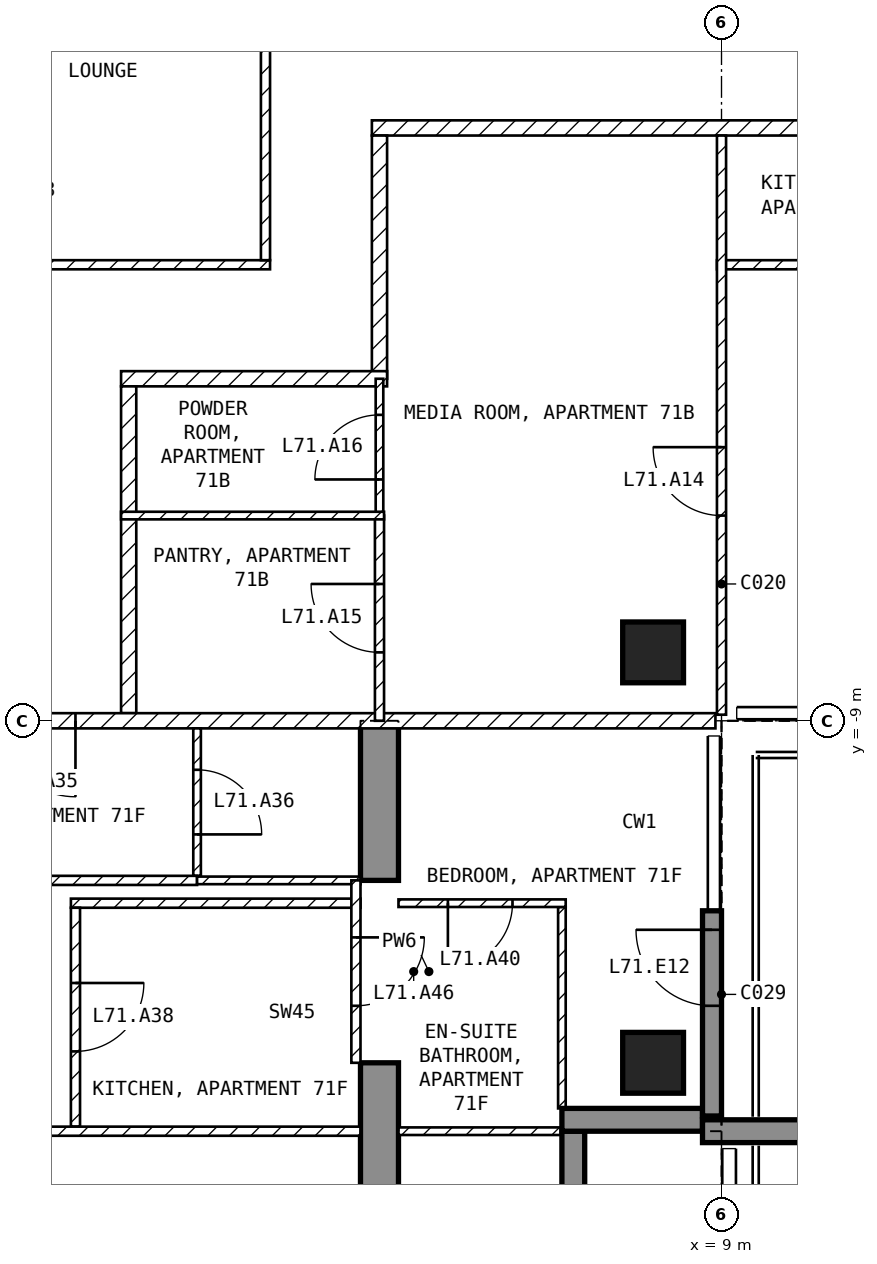
"""IFC4 building model, lengths in metres.
Left out: names, types, materials, properties, quantities, classifications, styles, units other than length and angle.
Written with IfcOpenShell. Run it as: python <this file> out.ifc"""

import sys

from ifc_helpers import new_model, si_unit, direction, frame, frame_2d, origin, origin_2d, place, context, subcontext, project, spatial, polyline, rectangle, outline, extrude, element, fill, save


model = new_model("IFC4")
c1 = context("Model", 3, precision=1e-05, world=origin(), true_north=direction((0.0, 1.0)))
c2 = subcontext(c1, "Body", "Model", "MODEL_VIEW")
j1 = project(units=[si_unit("LENGTHUNIT", "METRE"), si_unit("PLANEANGLEUNIT", "RADIAN")], contexts=[c1])
p1 = place(None, origin())
s1 = spatial("IfcSite", under=j1, at=p1, CompositionType="ELEMENT")
p2 = place(p1, origin())
s2 = spatial("IfcBuilding", under=s1, at=p2, CompositionType="ELEMENT")
p3 = place(p2, frame((0.0, 0.0, 278.0)))
s3 = spatial("IfcBuildingStorey", under=s2, at=p3, CompositionType="ELEMENT", Elevation=278.0)
for number, where, z_axis, x_axis in (
    (1, (8.1, -13.5, -0.25), (0.0, 0.0, 1.0), (1.0, 0.0, 0.0)),
    (2, (8.1, -8.1, -0.25), (0.0, 0.0, 1.0), (1.0, 0.0, 0.0)),
):
    element("IfcColumn", number, at=place(p3, frame(where, z_axis=z_axis, x_axis=x_axis)), inside=s3, PredefinedType="COLUMN", context=c2, shape_type="SweptSolid", body=[
        extrude(rectangle(XDim=0.8, YDim=0.8, at=origin_2d()), origin(), (0.0, 0.0, 1.0), 3.5),
    ])
p4 = place(p3, frame((4.25, -16.7, -0.25), z_axis=(1.0, 0.0, 0.0), x_axis=(0.0, 1.0, 0.0)))
e3 = element("IfcWall", 3, at=p4, inside=s3, PredefinedType="SHEAR", context=c2, shape_type="SweptSolid", body=[
    extrude(outline(polyline([(0.0, 0.0), (3.2, 0.0), (3.2, 2.65), (5.6, 2.65), (5.6, 0.0), (7.7, 0.0), (7.7, 3.5), (0.0, 3.5), (0.0, 0.0)])), origin(), (0.0, 0.0, 1.0), 0.5),
])
p5 = place(p3, frame((8.875, -14.2, 0.0), z_axis=(0.0, 0.0, 1.0), x_axis=(0.0, 1.0, 0.0)))
e4 = element("IfcWall", 4, at=p5, inside=s3, PredefinedType="SOLIDWALL", context=c2, shape_type="SweptSolid", body=[
    extrude(rectangle(XDim=2.7, YDim=0.25, at=frame_2d((1.35, 0.0))), origin(), (0.0, 0.0, 1.0), 3.25),
])
p6 = place(p5, frame((1.45, 0.0, 0.0)))
e5 = element("IfcOpeningElement", 5, at=p6, cuts=e4, PredefinedType="OPENING", context=c2, shape_type="SweptSolid", body=[
    extrude(rectangle(XDim=1.0, YDim=2.4, at=frame_2d((0.5, 1.2))), frame((0.0, 0.135, 0.0), z_axis=(0.0, -1.0, 0.0), x_axis=(1.0, 0.0, 0.0)), (0.0, 0.0, 1.0), 0.27),
])
p7 = place(p3, frame((7.05, -16.2, 0.0), z_axis=(0.0, 0.0, 1.0), x_axis=(0.0, 1.0, 0.0)))
e6 = element("IfcWall", 6, at=p7, inside=s3, PredefinedType="SOLIDWALL", context=c2, shape_type="SweptSolid", body=[
    extrude(rectangle(XDim=1.8, YDim=0.3, at=frame_2d((0.9, 0.0))), origin(), (0.0, 0.0, 1.0), 3.25),
])
p8 = place(p3, frame((6.9, -14.25, 0.0), z_axis=(0.0, 0.0, 1.0), x_axis=(1.0, 0.0, 0.0)))
e7 = element("IfcWall", 7, at=p8, inside=s3, PredefinedType="SOLIDWALL", context=c2, shape_type="SweptSolid", body=[
    extrude(rectangle(XDim=1.85, YDim=0.3, at=frame_2d((0.925, 0.0))), origin(), (0.0, 0.0, 1.0), 3.25),
])
p9 = place(p3, frame((8.75, -14.4, 0.0), z_axis=(0.0, 0.0, 1.0), x_axis=(1.0, 0.0, 0.0)))
e8 = element("IfcWall", 8, at=p9, inside=s3, PredefinedType="SOLIDWALL", context=c2, shape_type="SweptSolid", body=[
    extrude(rectangle(XDim=2.95, YDim=0.3, at=frame_2d((1.475, 0.0))), origin(), (0.0, 0.0, 1.0), 3.25),
])
p10 = place(p3, frame((-3.06, -3.0, 0.0), z_axis=(0.0, 0.0, 1.0), x_axis=(1.0, 0.0, 0.0)))
e9 = element("IfcWall", 9, at=p10, inside=s3, PredefinedType="PARTITIONING", context=c2, shape_type="SweptSolid", body=[
    extrude(rectangle(XDim=6.12, YDim=0.12, at=frame_2d((3.06, 0.0))), origin(), (0.0, 0.0, 1.0), 3.25),
])
p11 = place(p3, frame((3.0, -2.94, 0.0), z_axis=(0.0, 0.0, 1.0), x_axis=(0.0, 1.0, 0.0)))
e10 = element("IfcWall", 10, at=p11, inside=s3, PredefinedType="PARTITIONING", context=c2, shape_type="SweptSolid", body=[
    extrude(rectangle(XDim=5.88, YDim=0.12, at=frame_2d((2.94, 0.0))), origin(), (0.0, 0.0, 1.0), 3.25),
])
p12 = place(p3, frame((21.6, -1.2, 0.0), z_axis=(0.0, 0.0, 1.0), x_axis=(-1.0, 0.0, 0.0)))
e11 = element("IfcWall", 11, at=p12, inside=s3, PredefinedType="PARTITIONING", context=c2, shape_type="SweptSolid", body=[
    extrude(rectangle(XDim=17.2, YDim=0.2, at=frame_2d((8.6, 0.0))), origin(), (0.0, 0.0, 1.0), 3.25),
])
p13 = place(p12, frame((7.9, 0.0, 0.0)))
e12 = element("IfcOpeningElement", 12, at=p13, cuts=e11, PredefinedType="OPENING", context=c2, shape_type="SweptSolid", body=[
    extrude(rectangle(XDim=1.0, YDim=2.1, at=frame_2d((0.5, 1.05))), frame((0.0, 0.11, 0.0), z_axis=(0.0, -1.0, 0.0), x_axis=(1.0, 0.0, 0.0)), (0.0, 0.0, 1.0), 0.22),
])
p14 = place(p3, frame((4.5, -1.3, 0.0), z_axis=(0.0, 0.0, 1.0), x_axis=(0.0, -1.0, 0.0)))
e13 = element("IfcWall", 13, at=p14, inside=s3, PredefinedType="PARTITIONING", context=c2, shape_type="SweptSolid", body=[
    extrude(rectangle(XDim=3.2, YDim=0.2, at=frame_2d((1.6, 0.0))), origin(), (0.0, 0.0, 1.0), 3.25),
])
p15 = place(p3, frame((4.6, -4.5, 0.0), z_axis=(0.0, 0.0, 1.0), x_axis=(-1.0, 0.0, 0.0)))
e14 = element("IfcWall", 14, at=p15, inside=s3, PredefinedType="PARTITIONING", context=c2, shape_type="SweptSolid", body=[
    extrude(rectangle(XDim=3.5, YDim=0.2, at=frame_2d((1.75, 0.0))), origin(), (0.0, 0.0, 1.0), 3.25),
])
p16 = place(p3, frame((1.2, -4.6, 0.0), z_axis=(0.0, 0.0, 1.0), x_axis=(0.0, -1.0, 0.0)))
e15 = element("IfcWall", 15, at=p16, inside=s3, PredefinedType="PARTITIONING", context=c2, shape_type="SweptSolid", body=[
    extrude(rectangle(XDim=4.3, YDim=0.2, at=frame_2d((2.15, 0.0))), origin(), (0.0, 0.0, 1.0), 3.25),
])
p17 = place(p3, frame((8.92, -9.0, 0.0), z_axis=(0.0, 0.0, 1.0), x_axis=(-1.0, 0.0, 0.0)))
e16 = element("IfcWall", 16, at=p17, inside=s3, PredefinedType="PARTITIONING", context=c2, shape_type="SweptSolid", body=[
    extrude(rectangle(XDim=17.84, YDim=0.2, at=frame_2d((8.92, 0.0))), origin(), (0.0, 0.0, 1.0), 3.25),
])
p18 = place(p17, frame((8.42, 0.0, 0.0)))
e17 = element("IfcOpeningElement", 17, at=p18, cuts=e16, PredefinedType="OPENING", context=c2, shape_type="SweptSolid", body=[
    extrude(rectangle(XDim=1.0, YDim=2.1, at=frame_2d((0.5, 1.05))), frame((0.0, 0.11, 0.0), z_axis=(0.0, -1.0, 0.0), x_axis=(1.0, 0.0, 0.0)), (0.0, 0.0, 1.0), 0.22),
])
p19 = place(p3, frame((16.8, -3.0, 0.0), z_axis=(0.0, 0.0, 1.0), x_axis=(-1.0, 0.0, 0.0)))
e18 = element("IfcWall", 18, at=p19, inside=s3, PredefinedType="PARTITIONING", context=c2, shape_type="SweptSolid", body=[
    extrude(rectangle(XDim=7.86, YDim=0.12, at=frame_2d((3.93, 0.0))), origin(), (0.0, 0.0, 1.0), 3.25),
])
p20 = place(p19, frame((3.15, 0.0, 0.0)))
e19 = element("IfcOpeningElement", 19, at=p20, cuts=e18, PredefinedType="OPENING", context=c2, shape_type="SweptSolid", body=[
    extrude(rectangle(XDim=0.9, YDim=2.1, at=frame_2d((0.45, 1.05))), frame((0.0, 0.07, 0.0), z_axis=(0.0, -1.0, 0.0), x_axis=(1.0, 0.0, 0.0)), (0.0, 0.0, 1.0), 0.14),
])
p21 = place(p3, frame((9.0, -8.92, 0.0), z_axis=(0.0, 0.0, 1.0), x_axis=(0.0, 1.0, 0.0)))
e20 = element("IfcWall", 20, at=p21, inside=s3, PredefinedType="PARTITIONING", context=c2, shape_type="SweptSolid", body=[
    extrude(rectangle(XDim=7.62, YDim=0.12, at=frame_2d((3.81, 0.0))), origin(), (0.0, 0.0, 1.0), 3.25),
])
p22 = place(p21, frame((2.62, 0.0, 0.0)))
e21 = element("IfcOpeningElement", 21, at=p22, cuts=e20, PredefinedType="OPENING", context=c2, shape_type="SweptSolid", body=[
    extrude(rectangle(XDim=0.9, YDim=2.1, at=frame_2d((0.45, 1.05))), frame((0.0, 0.07, 0.0), z_axis=(0.0, -1.0, 0.0), x_axis=(1.0, 0.0, 0.0)), (0.0, 0.0, 1.0), 0.14),
])
p23 = place(p3, frame((4.5, -6.3, 0.0), z_axis=(0.0, 0.0, 1.0), x_axis=(0.0, 1.0, 0.0)))
e22 = element("IfcWall", 22, at=p23, inside=s3, PredefinedType="PARTITIONING", context=c2, shape_type="SweptSolid", body=[
    extrude(rectangle(XDim=1.8, YDim=0.1, at=frame_2d((0.9, 0.0))), origin(), (0.0, 0.0, 1.0), 3.25),
])
p24 = place(p23, frame((0.475, 0.0, 0.0)))
e23 = element("IfcOpeningElement", 23, at=p24, cuts=e22, PredefinedType="OPENING", context=c2, shape_type="SweptSolid", body=[
    extrude(rectangle(XDim=0.85, YDim=2.1, at=frame_2d((0.425, 1.05))), frame((0.0, 0.06, 0.0), z_axis=(0.0, -1.0, 0.0), x_axis=(1.0, 0.0, 0.0)), (0.0, 0.0, 1.0), 0.12),
])
p25 = place(p3, frame((4.5, -9.0, 0.0), z_axis=(0.0, 0.0, 1.0), x_axis=(0.0, 1.0, 0.0)))
e24 = element("IfcWall", 24, at=p25, inside=s3, PredefinedType="PARTITIONING", context=c2, shape_type="SweptSolid", body=[
    extrude(rectangle(XDim=2.7, YDim=0.12, at=frame_2d((1.35, 0.0))), origin(), (0.0, 0.0, 1.0), 3.25),
])
p26 = place(p25, frame((0.9, 0.0, 0.0)))
e25 = element("IfcOpeningElement", 25, at=p26, cuts=e24, PredefinedType="OPENING", context=c2, shape_type="SweptSolid", body=[
    extrude(rectangle(XDim=0.9, YDim=2.1, at=frame_2d((0.45, 1.05))), frame((0.0, 0.07, 0.0), z_axis=(0.0, -1.0, 0.0), x_axis=(1.0, 0.0, 0.0)), (0.0, 0.0, 1.0), 0.14),
])
p27 = place(p3, frame((4.56, -6.3, 0.0), z_axis=(0.0, 0.0, 1.0), x_axis=(-1.0, 0.0, 0.0)))
e26 = element("IfcWall", 26, at=p27, inside=s3, PredefinedType="PARTITIONING", context=c2, shape_type="SweptSolid", body=[
    extrude(rectangle(XDim=3.46, YDim=0.1, at=frame_2d((1.73, 0.0))), origin(), (0.0, 0.0, 1.0), 3.25),
])
p28 = place(p3, frame((2.1, -9.1, 0.0), z_axis=(0.0, 0.0, 1.0), x_axis=(0.0, -1.0, 0.0)))
e27 = element("IfcWall", 27, at=p28, inside=s3, PredefinedType="PARTITIONING", context=c2, shape_type="SweptSolid", body=[
    extrude(rectangle(XDim=1.94, YDim=0.1, at=frame_2d((0.97, 0.0))), origin(), (0.0, 0.0, 1.0), 3.25),
])
p29 = place(p28, frame((0.545, 0.0, 0.0)))
e28 = element("IfcOpeningElement", 28, at=p29, cuts=e27, PredefinedType="OPENING", context=c2, shape_type="SweptSolid", body=[
    extrude(rectangle(XDim=0.85, YDim=2.1, at=frame_2d((0.425, 1.05))), frame((0.0, 0.06, 0.0), z_axis=(0.0, -1.0, 0.0), x_axis=(1.0, 0.0, 0.0)), (0.0, 0.0, 1.0), 0.12),
])
p30 = place(p3, frame((2.1, -11.1, 0.0), z_axis=(0.0, 0.0, 1.0), x_axis=(-1.0, 0.0, 0.0)))
e29 = element("IfcWall", 29, at=p30, inside=s3, PredefinedType="PARTITIONING", context=c2, shape_type="SweptSolid", body=[
    extrude(rectangle(XDim=6.35, YDim=0.12, at=frame_2d((3.175, 0.0))), origin(), (0.0, 0.0, 1.0), 3.25),
])
p31 = place(p30, frame((2.725, 0.0, 0.0)))
e30 = element("IfcOpeningElement", 30, at=p31, cuts=e29, PredefinedType="OPENING", context=c2, shape_type="SweptSolid", body=[
    extrude(rectangle(XDim=0.9, YDim=2.1, at=frame_2d((0.45, 1.05))), frame((0.0, 0.07, 0.0), z_axis=(0.0, -1.0, 0.0), x_axis=(1.0, 0.0, 0.0)), (0.0, 0.0, 1.0), 0.14),
])
p32 = place(p3, frame((4.25, -11.1, 0.0), z_axis=(0.0, 0.0, 1.0), x_axis=(-1.0, 0.0, 0.0)))
e31 = element("IfcWall", 31, at=p32, inside=s3, PredefinedType="PARTITIONING", context=c2, shape_type="SweptSolid", body=[
    extrude(rectangle(XDim=2.15, YDim=0.1, at=frame_2d((1.075, 0.0))), origin(), (0.0, 0.0, 1.0), 3.25),
])
p33 = place(p3, frame((4.25, -11.4, 0.0), z_axis=(0.0, 0.0, 1.0), x_axis=(-1.0, 0.0, 0.0)))
e32 = element("IfcWall", 32, at=p33, inside=s3, PredefinedType="PARTITIONING", context=c2, shape_type="SweptSolid", body=[
    extrude(rectangle(XDim=3.81, YDim=0.12, at=frame_2d((1.905, 0.0))), origin(), (0.0, 0.0, 1.0), 3.25),
])
p34 = place(p3, frame((0.5, -11.46, 0.0), z_axis=(0.0, 0.0, 1.0), x_axis=(0.0, -1.0, 0.0)))
e33 = element("IfcWall", 33, at=p34, inside=s3, PredefinedType="PARTITIONING", context=c2, shape_type="SweptSolid", body=[
    extrude(rectangle(XDim=2.88, YDim=0.12, at=frame_2d((1.44, 0.0))), origin(), (0.0, 0.0, 1.0), 3.25),
])
p35 = place(p34, frame((0.99, 0.0, 0.0)))
e34 = element("IfcOpeningElement", 34, at=p35, cuts=e33, PredefinedType="OPENING", context=c2, shape_type="SweptSolid", body=[
    extrude(rectangle(XDim=0.9, YDim=2.1, at=frame_2d((0.45, 1.05))), frame((0.0, 0.07, 0.0), z_axis=(0.0, -1.0, 0.0), x_axis=(1.0, 0.0, 0.0)), (0.0, 0.0, 1.0), 0.14),
])
p36 = place(p3, frame((4.25, -14.4, 0.0), z_axis=(0.0, 0.0, 1.0), x_axis=(-1.0, 0.0, 0.0)))
e35 = element("IfcWall", 35, at=p36, inside=s3, PredefinedType="PARTITIONING", context=c2, shape_type="SweptSolid", body=[
    extrude(rectangle(XDim=8.5, YDim=0.12, at=frame_2d((4.25, 0.0))), origin(), (0.0, 0.0, 1.0), 3.25),
])
p37 = place(p36, frame((5.675, 0.0, 0.0)))
e36 = element("IfcOpeningElement", 36, at=p37, cuts=e35, PredefinedType="OPENING", context=c2, shape_type="SweptSolid", body=[
    extrude(rectangle(XDim=0.9, YDim=2.1, at=frame_2d((0.45, 1.05))), frame((0.0, 0.07, 0.0), z_axis=(0.0, -1.0, 0.0), x_axis=(1.0, 0.0, 0.0)), (0.0, 0.0, 1.0), 0.14),
])
p38 = place(p3, frame((6.9, -14.1, 0.0), z_axis=(0.0, 0.0, 1.0), x_axis=(0.0, 1.0, 0.0)))
e37 = element("IfcWall", 37, at=p38, inside=s3, PredefinedType="PARTITIONING", context=c2, shape_type="SweptSolid", body=[
    extrude(rectangle(XDim=2.65, YDim=0.1, at=frame_2d((1.325, 0.0))), origin(), (0.0, 0.0, 1.0), 3.25),
])
p39 = place(p3, frame((6.95, -11.4, 0.0), z_axis=(0.0, 0.0, 1.0), x_axis=(-1.0, 0.0, 0.0)))
e38 = element("IfcWall", 38, at=p39, inside=s3, PredefinedType="PARTITIONING", context=c2, shape_type="SweptSolid", body=[
    extrude(rectangle(XDim=2.2, YDim=0.1, at=frame_2d((1.1, 0.0))), origin(), (0.0, 0.0, 1.0), 3.25),
])
p40 = place(p39, frame((0.7, 0.0, 0.0)))
e39 = element("IfcOpeningElement", 39, at=p40, cuts=e38, PredefinedType="OPENING", context=c2, shape_type="SweptSolid", body=[
    extrude(rectangle(XDim=0.85, YDim=2.1, at=frame_2d((0.425, 1.05))), frame((0.0, 0.06, 0.0), z_axis=(0.0, -1.0, 0.0), x_axis=(1.0, 0.0, 0.0)), (0.0, 0.0, 1.0), 0.12),
])
p41 = place(p3, frame((7.12, -14.4, 0.0), z_axis=(0.0, 0.0, 1.0), x_axis=(-1.0, 0.0, 0.0)))
e40 = element("IfcWall", 40, at=p41, inside=s3, PredefinedType="PARTITIONING", context=c2, shape_type="SweptSolid", body=[
    extrude(rectangle(XDim=2.37, YDim=0.1, at=frame_2d((1.185, 0.0))), origin(), (0.0, 0.0, 1.0), 3.25),
])
p42 = place(p3, frame((4.19, -11.1, 0.0), z_axis=(0.0, 0.0, 1.0), x_axis=(0.0, -1.0, 0.0)))
e41 = element("IfcWall", 41, at=p42, inside=s3, PredefinedType="PARTITIONING", context=c2, shape_type="SweptSolid", body=[
    extrude(rectangle(XDim=2.4, YDim=0.12, at=frame_2d((1.2, 0.0))), origin(), (0.0, 0.0, 1.0), 2.4),
])
p43 = place(p42, frame((0.75, 0.0, 0.0)))
e42 = element("IfcOpeningElement", 42, at=p43, cuts=e41, PredefinedType="OPENING", context=c2, shape_type="SweptSolid", body=[
    extrude(rectangle(XDim=0.9, YDim=2.1, at=frame_2d((0.45, 1.05))), frame((0.0, 0.07, 0.0), z_axis=(0.0, -1.0, 0.0), x_axis=(1.0, 0.0, 0.0)), (0.0, 0.0, 1.0), 0.14),
])
p44 = place(p6, origin())
e43 = element("IfcDoor", 43, at=p44, inside=s3, OperationType="SINGLE_SWING_RIGHT", PredefinedType="DOOR", context=c2, shape_type="SweptSolid", body=[
    extrude(rectangle(XDim=1.0, YDim=2.4, at=frame_2d((0.5, 1.2))), frame((0.0, 0.025, 0.0), z_axis=(0.0, -1.0, 0.0), x_axis=(1.0, 0.0, 0.0)), (0.0, 0.0, 1.0), 0.05),
])
fill(e5, e43)
p45 = place(p22, origin())
e44 = element("IfcDoor", 44, at=p45, inside=s3, OperationType="SINGLE_SWING_RIGHT", PredefinedType="DOOR", context=c2, shape_type="SweptSolid", body=[
    extrude(rectangle(XDim=0.9, YDim=2.1, at=frame_2d((0.45, 1.05))), frame((0.0, 0.025, 0.0), z_axis=(0.0, -1.0, 0.0), x_axis=(1.0, 0.0, 0.0)), (0.0, 0.0, 1.0), 0.05),
])
fill(e21, e44)
p46 = place(p26, origin())
e45 = element("IfcDoor", 45, at=p46, inside=s3, OperationType="SINGLE_SWING_RIGHT", PredefinedType="DOOR", context=c2, shape_type="SweptSolid", body=[
    extrude(rectangle(XDim=0.9, YDim=2.1, at=frame_2d((0.45, 1.05))), frame((0.0, 0.025, 0.0), z_axis=(0.0, -1.0, 0.0), x_axis=(1.0, 0.0, 0.0)), (0.0, 0.0, 1.0), 0.05),
])
fill(e25, e45)
p47 = place(p24, origin())
e46 = element("IfcDoor", 46, at=p47, inside=s3, OperationType="SINGLE_SWING_LEFT", PredefinedType="DOOR", context=c2, shape_type="SweptSolid", body=[
    extrude(rectangle(XDim=0.85, YDim=2.1, at=frame_2d((0.425, 1.05))), frame((0.0, 0.025, 0.0), z_axis=(0.0, -1.0, 0.0), x_axis=(1.0, 0.0, 0.0)), (0.0, 0.0, 1.0), 0.05),
])
fill(e23, e46)
p48 = place(p18, origin())
e47 = element("IfcDoor", 47, at=p48, inside=s3, OperationType="SINGLE_SWING_LEFT", PredefinedType="DOOR", context=c2, shape_type="SweptSolid", body=[
    extrude(rectangle(XDim=1.0, YDim=2.1, at=frame_2d((0.5, 1.05))), frame((0.0, 0.025, 0.0), z_axis=(0.0, -1.0, 0.0), x_axis=(1.0, 0.0, 0.0)), (0.0, 0.0, 1.0), 0.05),
])
fill(e17, e47)
p49 = place(p29, origin())
e48 = element("IfcDoor", 48, at=p49, inside=s3, OperationType="SINGLE_SWING_RIGHT", PredefinedType="DOOR", context=c2, shape_type="SweptSolid", body=[
    extrude(rectangle(XDim=0.85, YDim=2.1, at=frame_2d((0.425, 1.05))), frame((0.0, 0.025, 0.0), z_axis=(0.0, -1.0, 0.0), x_axis=(1.0, 0.0, 0.0)), (0.0, 0.0, 1.0), 0.05),
])
fill(e28, e48)
p50 = place(p35, origin())
e49 = element("IfcDoor", 49, at=p50, inside=s3, OperationType="SINGLE_SWING_LEFT", PredefinedType="DOOR", context=c2, shape_type="SweptSolid", body=[
    extrude(rectangle(XDim=0.9, YDim=2.1, at=frame_2d((0.45, 1.05))), frame((0.0, 0.025, 0.0), z_axis=(0.0, -1.0, 0.0), x_axis=(1.0, 0.0, 0.0)), (0.0, 0.0, 1.0), 0.05),
])
fill(e34, e49)
p51 = place(p40, origin())
e50 = element("IfcDoor", 50, at=p51, inside=s3, OperationType="SINGLE_SWING_RIGHT", PredefinedType="DOOR", context=c2, shape_type="SweptSolid", body=[
    extrude(rectangle(XDim=0.85, YDim=2.1, at=frame_2d((0.425, 1.05))), frame((0.0, 0.025, 0.0), z_axis=(0.0, -1.0, 0.0), x_axis=(1.0, 0.0, 0.0)), (0.0, 0.0, 1.0), 0.05),
])
fill(e39, e50)
p52 = place(p43, origin())
e51 = element("IfcDoor", 51, at=p52, inside=s3, OperationType="SINGLE_SWING_LEFT", PredefinedType="DOOR", context=c2, shape_type="SweptSolid", body=[
    extrude(rectangle(XDim=0.9, YDim=2.1, at=frame_2d((0.45, 1.05))), frame((0.0, 0.025, 0.0), z_axis=(0.0, -1.0, 0.0), x_axis=(1.0, 0.0, 0.0)), (0.0, 0.0, 1.0), 0.05),
])
fill(e42, e51)
save(model, sys.argv[1])
